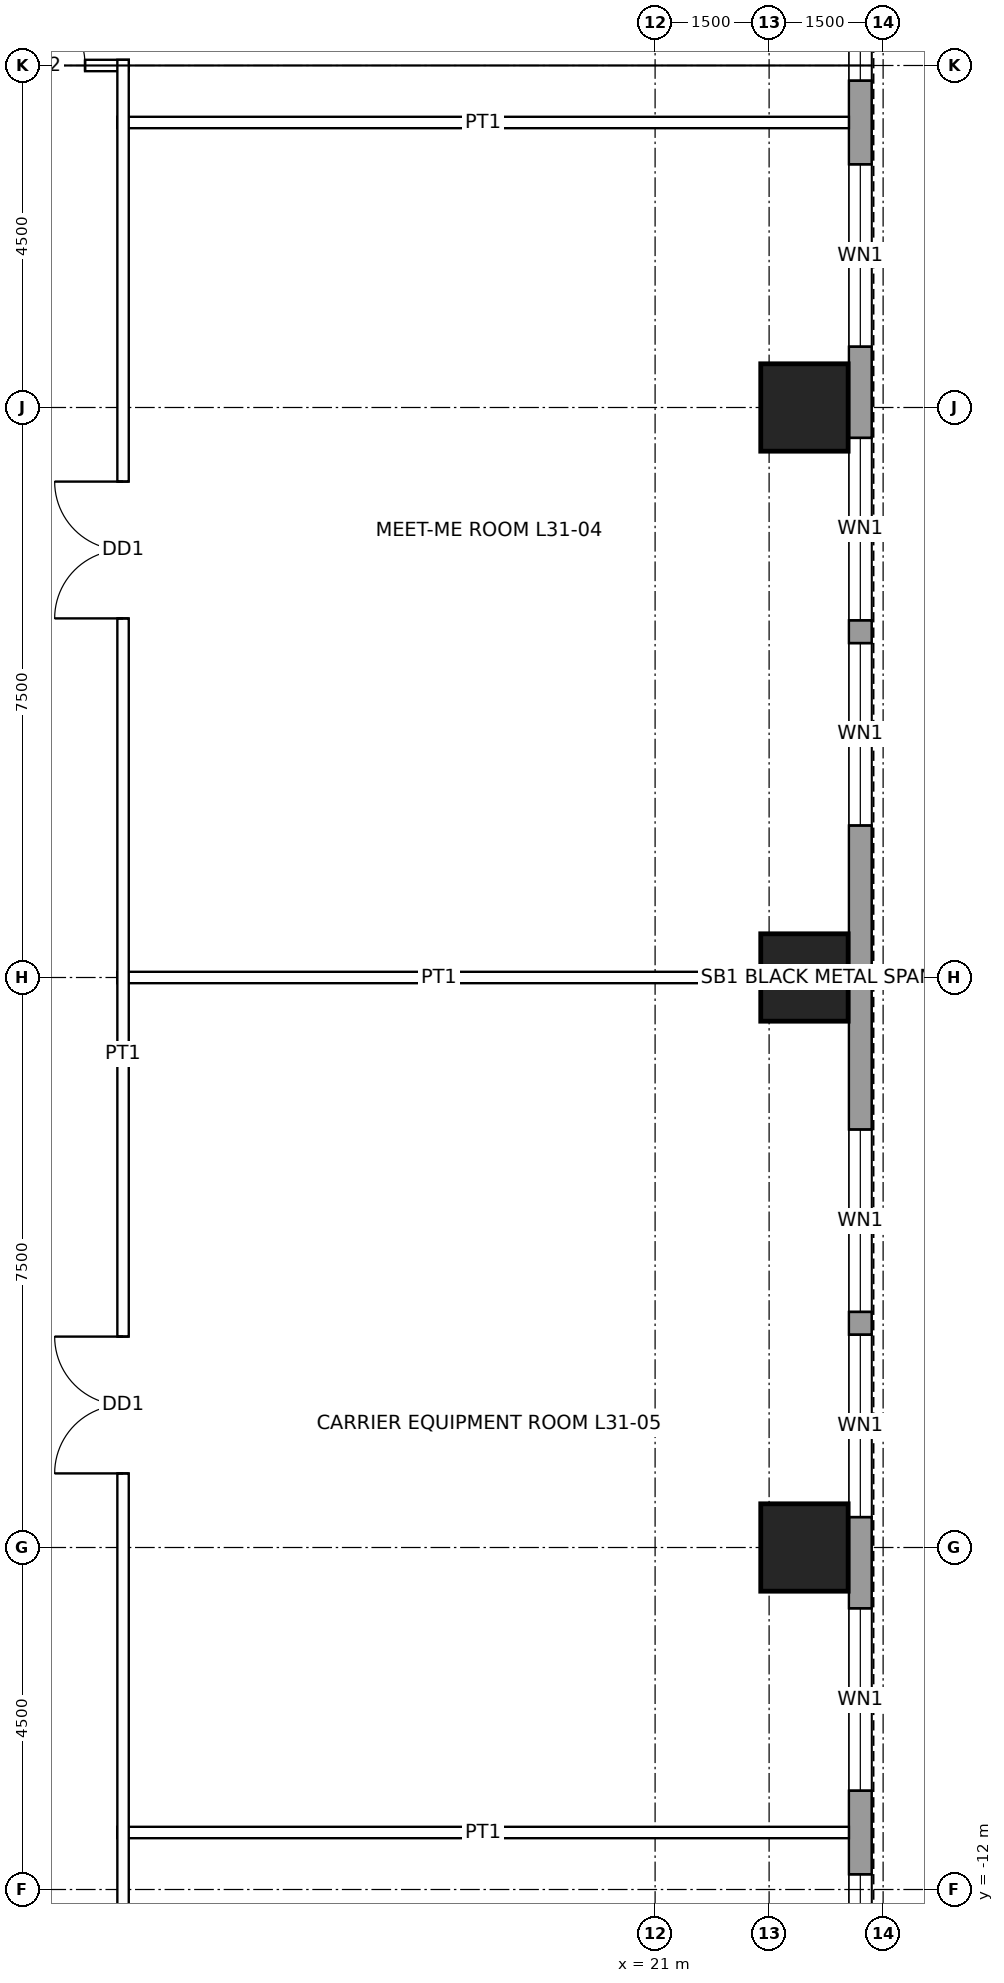
"""IFC4 building model, lengths in metres.
Left out: names, types, materials, properties, quantities, classifications, styles, units other than length and angle.
Written with IfcOpenShell. Run it as: python <this file> out.ifc"""

import sys

from ifc_helpers import new_model, si_unit, direction, frame, frame_2d, origin, origin_2d, place, context, subcontext, project, spatial, rectangle, hollow_rectangle, extrude, element, fill, save


model = new_model("IFC4")
c1 = context("Model", 3, precision=1e-05, world=origin(), true_north=direction((0.0, 1.0)))
c2 = subcontext(c1, "Body", "Model", "MODEL_VIEW")
j1 = project(units=[si_unit("LENGTHUNIT", "METRE"), si_unit("PLANEANGLEUNIT", "RADIAN")], contexts=[c1])
p1 = place(None, origin())
s1 = spatial("IfcSite", under=j1, at=p1, CompositionType="ELEMENT")
p2 = place(p1, origin())
s2 = spatial("IfcBuilding", under=s1, at=p2, CompositionType="ELEMENT")
p3 = place(p2, frame((0.0, 0.0, 153.9)))
s3 = spatial("IfcBuildingStorey", under=s2, at=p3, CompositionType="ELEMENT", Elevation=153.9)
for number, where, z_axis, x_axis in (
    (1, (22.965, 7.5, 0.0), (0.0, 0.0, 1.0), (1.0, 0.0, 0.0)),
    (2, (22.965, 0.0, 0.0), (0.0, 0.0, 1.0), (1.0, 0.0, 0.0)),
    (3, (22.965, -7.5, 0.0), (0.0, 0.0, 1.0), (1.0, 0.0, 0.0)),
):
    element("IfcColumn", number, at=place(p3, frame(where, z_axis=z_axis, x_axis=x_axis)), inside=s3, PredefinedType="COLUMN", context=c2, shape_type="SweptSolid", body=[
        extrude(hollow_rectangle(XDim=1.15, YDim=1.15, WallThickness=0.075, at=origin_2d()), origin(), (0.0, 0.0, 1.0), 4.5),
    ])
p4 = place(p3, frame((23.7, 16.2, 0.0), z_axis=(0.0, 0.0, 1.0), x_axis=(0.0, -1.0, 0.0)))
e4 = element("IfcWall", 4, at=p4, inside=s3, PredefinedType="SOLIDWALL", context=c2, shape_type="SweptSolid", body=[
    extrude(rectangle(XDim=32.4, YDim=0.3, at=frame_2d((16.2, 0.0))), origin(), (0.0, 0.0, 1.0), 4.3),
])
p5 = place(p4, frame((2.0, 0.0, 1.0)))
e5 = element("IfcOpeningElement", 5, at=p5, cuts=e4, PredefinedType="OPENING", context=c2, shape_type="SweptSolid", body=[
    extrude(rectangle(XDim=2.4, YDim=1.2, at=frame_2d((1.2, 0.6))), frame((0.0, 0.16, 0.0), z_axis=(0.0, -1.0, 0.0), x_axis=(1.0, 0.0, 0.0)), (0.0, 0.0, 1.0), 0.32),
])
p6 = place(p4, frame((5.5, 0.0, 1.0)))
e6 = element("IfcOpeningElement", 6, at=p6, cuts=e4, PredefinedType="OPENING", context=c2, shape_type="SweptSolid", body=[
    extrude(rectangle(XDim=2.4, YDim=1.2, at=frame_2d((1.2, 0.6))), frame((0.0, 0.16, 0.0), z_axis=(0.0, -1.0, 0.0), x_axis=(1.0, 0.0, 0.0)), (0.0, 0.0, 1.0), 0.32),
])
p7 = place(p4, frame((9.1, 0.0, 1.0)))
e7 = element("IfcOpeningElement", 7, at=p7, cuts=e4, PredefinedType="OPENING", context=c2, shape_type="SweptSolid", body=[
    extrude(rectangle(XDim=2.4, YDim=1.2, at=frame_2d((1.2, 0.6))), frame((0.0, 0.16, 0.0), z_axis=(0.0, -1.0, 0.0), x_axis=(1.0, 0.0, 0.0)), (0.0, 0.0, 1.0), 0.32),
])
p8 = place(p4, frame((11.8, 0.0, 1.0)))
e8 = element("IfcOpeningElement", 8, at=p8, cuts=e4, PredefinedType="OPENING", context=c2, shape_type="SweptSolid", body=[
    extrude(rectangle(XDim=2.4, YDim=1.2, at=frame_2d((1.2, 0.6))), frame((0.0, 0.16, 0.0), z_axis=(0.0, -1.0, 0.0), x_axis=(1.0, 0.0, 0.0)), (0.0, 0.0, 1.0), 0.32),
])
p9 = place(p4, frame((18.2, 0.0, 1.0)))
e9 = element("IfcOpeningElement", 9, at=p9, cuts=e4, PredefinedType="OPENING", context=c2, shape_type="SweptSolid", body=[
    extrude(rectangle(XDim=2.4, YDim=1.2, at=frame_2d((1.2, 0.6))), frame((0.0, 0.16, 0.0), z_axis=(0.0, -1.0, 0.0), x_axis=(1.0, 0.0, 0.0)), (0.0, 0.0, 1.0), 0.32),
])
p10 = place(p4, frame((20.9, 0.0, 1.0)))
e10 = element("IfcOpeningElement", 10, at=p10, cuts=e4, PredefinedType="OPENING", context=c2, shape_type="SweptSolid", body=[
    extrude(rectangle(XDim=2.4, YDim=1.2, at=frame_2d((1.2, 0.6))), frame((0.0, 0.16, 0.0), z_axis=(0.0, -1.0, 0.0), x_axis=(1.0, 0.0, 0.0)), (0.0, 0.0, 1.0), 0.32),
])
p11 = place(p4, frame((24.5, 0.0, 1.0)))
e11 = element("IfcOpeningElement", 11, at=p11, cuts=e4, PredefinedType="OPENING", context=c2, shape_type="SweptSolid", body=[
    extrude(rectangle(XDim=2.4, YDim=1.2, at=frame_2d((1.2, 0.6))), frame((0.0, 0.16, 0.0), z_axis=(0.0, -1.0, 0.0), x_axis=(1.0, 0.0, 0.0)), (0.0, 0.0, 1.0), 0.32),
])
p12 = place(p4, frame((28.0, 0.0, 1.0)))
e12 = element("IfcOpeningElement", 12, at=p12, cuts=e4, PredefinedType="OPENING", context=c2, shape_type="SweptSolid", body=[
    extrude(rectangle(XDim=2.4, YDim=1.2, at=frame_2d((1.2, 0.6))), frame((0.0, 0.16, 0.0), z_axis=(0.0, -1.0, 0.0), x_axis=(1.0, 0.0, 0.0)), (0.0, 0.0, 1.0), 0.32),
])
p13 = place(p3, frame((13.925, -11.25, 0.0), z_axis=(0.0, 0.0, 1.0), x_axis=(1.0, 0.0, 0.0)))
e13 = element("IfcWall", 13, at=p13, inside=s3, PredefinedType="PARTITIONING", context=c2, shape_type="SweptSolid", body=[
    extrude(rectangle(XDim=9.625, YDim=0.15, at=frame_2d((4.812, 0.0))), origin(), (0.0, 0.0, 1.0), 3.431),
])
p14 = place(p3, frame((13.925, 0.0, 0.0), z_axis=(0.0, 0.0, 1.0), x_axis=(1.0, 0.0, 0.0)))
e14 = element("IfcWall", 14, at=p14, inside=s3, PredefinedType="PARTITIONING", context=c2, shape_type="SweptSolid", body=[
    extrude(rectangle(XDim=8.465, YDim=0.15, at=frame_2d((4.232, 0.0))), origin(), (0.0, 0.0, 1.0), 3.431),
])
p15 = place(p3, frame((13.925, 11.25, 0.0), z_axis=(0.0, 0.0, 1.0), x_axis=(1.0, 0.0, 0.0)))
e15 = element("IfcWall", 15, at=p15, inside=s3, PredefinedType="PARTITIONING", context=c2, shape_type="SweptSolid", body=[
    extrude(rectangle(XDim=9.625, YDim=0.15, at=frame_2d((4.812, 0.0))), origin(), (0.0, 0.0, 1.0), 3.431),
])
p16 = place(p3, frame((12.0, 12.0, 0.0), z_axis=(0.0, 0.0, 1.0), x_axis=(1.0, 0.0, 0.0)))
e16 = element("IfcWall", 16, at=p16, inside=s3, PredefinedType="PARTITIONING", context=c2, shape_type="SweptSolid", body=[
    extrude(rectangle(XDim=2.075, YDim=0.15, at=frame_2d((1.038, 0.0))), origin(), (0.0, 0.0, 1.0), 3.284),
])
p17 = place(p16, frame((0.5, 0.0, 0.0)))
e17 = element("IfcOpeningElement", 17, at=p17, cuts=e16, PredefinedType="OPENING", context=c2, shape_type="SweptSolid", body=[
    extrude(rectangle(XDim=1.0, YDim=2.1, at=frame_2d((0.5, 1.05))), frame((0.0, 0.085, 0.0), z_axis=(0.0, -1.0, 0.0), x_axis=(1.0, 0.0, 0.0)), (0.0, 0.0, 1.0), 0.17),
])
p18 = place(p3, frame((14.0, -14.075, 0.0), z_axis=(0.0, 0.0, 1.0), x_axis=(0.0, 1.0, 0.0)))
e18 = element("IfcWall", 18, at=p18, inside=s3, PredefinedType="PARTITIONING", context=c2, shape_type="SweptSolid", body=[
    extrude(rectangle(XDim=26.15, YDim=0.15, at=frame_2d((13.075, 0.0))), origin(), (0.0, 0.0, 1.0), 4.3),
])
p19 = place(p18, frame((18.8, 0.0, 0.0)))
e19 = element("IfcOpeningElement", 19, at=p19, cuts=e18, PredefinedType="OPENING", context=c2, shape_type="SweptSolid", body=[
    extrude(rectangle(XDim=1.8, YDim=2.4, at=frame_2d((0.9, 1.2))), frame((0.0, 0.085, 0.0), z_axis=(0.0, -1.0, 0.0), x_axis=(1.0, 0.0, 0.0)), (0.0, 0.0, 1.0), 0.17),
])
p20 = place(p18, frame((7.55, 0.0, 0.0)))
e20 = element("IfcOpeningElement", 20, at=p20, cuts=e18, PredefinedType="OPENING", context=c2, shape_type="SweptSolid", body=[
    extrude(rectangle(XDim=1.8, YDim=2.4, at=frame_2d((0.9, 1.2))), frame((0.0, 0.085, 0.0), z_axis=(0.0, -1.0, 0.0), x_axis=(1.0, 0.0, 0.0)), (0.0, 0.0, 1.0), 0.17),
])
p21 = place(p5, origin())
e21 = element("IfcWindow", 21, at=p21, inside=s3, PartitioningType="SINGLE_PANEL", PredefinedType="WINDOW", context=c2, shape_type="SweptSolid", body=[
    extrude(rectangle(XDim=2.4, YDim=1.2, at=frame_2d((1.2, 0.6))), frame((0.0, 0.03, 0.0), z_axis=(0.0, -1.0, 0.0), x_axis=(1.0, 0.0, 0.0)), (0.0, 0.0, 1.0), 0.06),
])
fill(e5, e21)
p22 = place(p6, origin())
e22 = element("IfcWindow", 22, at=p22, inside=s3, PartitioningType="SINGLE_PANEL", PredefinedType="WINDOW", context=c2, shape_type="SweptSolid", body=[
    extrude(rectangle(XDim=2.4, YDim=1.2, at=frame_2d((1.2, 0.6))), frame((0.0, 0.03, 0.0), z_axis=(0.0, -1.0, 0.0), x_axis=(1.0, 0.0, 0.0)), (0.0, 0.0, 1.0), 0.06),
])
fill(e6, e22)
p23 = place(p7, origin())
e23 = element("IfcWindow", 23, at=p23, inside=s3, PartitioningType="SINGLE_PANEL", PredefinedType="WINDOW", context=c2, shape_type="SweptSolid", body=[
    extrude(rectangle(XDim=2.4, YDim=1.2, at=frame_2d((1.2, 0.6))), frame((0.0, 0.03, 0.0), z_axis=(0.0, -1.0, 0.0), x_axis=(1.0, 0.0, 0.0)), (0.0, 0.0, 1.0), 0.06),
])
fill(e7, e23)
p24 = place(p8, origin())
e24 = element("IfcWindow", 24, at=p24, inside=s3, PartitioningType="SINGLE_PANEL", PredefinedType="WINDOW", context=c2, shape_type="SweptSolid", body=[
    extrude(rectangle(XDim=2.4, YDim=1.2, at=frame_2d((1.2, 0.6))), frame((0.0, 0.03, 0.0), z_axis=(0.0, -1.0, 0.0), x_axis=(1.0, 0.0, 0.0)), (0.0, 0.0, 1.0), 0.06),
])
fill(e8, e24)
p25 = place(p9, origin())
e25 = element("IfcWindow", 25, at=p25, inside=s3, PartitioningType="SINGLE_PANEL", PredefinedType="WINDOW", context=c2, shape_type="SweptSolid", body=[
    extrude(rectangle(XDim=2.4, YDim=1.2, at=frame_2d((1.2, 0.6))), frame((0.0, 0.03, 0.0), z_axis=(0.0, -1.0, 0.0), x_axis=(1.0, 0.0, 0.0)), (0.0, 0.0, 1.0), 0.06),
])
fill(e9, e25)
p26 = place(p10, origin())
e26 = element("IfcWindow", 26, at=p26, inside=s3, PartitioningType="SINGLE_PANEL", PredefinedType="WINDOW", context=c2, shape_type="SweptSolid", body=[
    extrude(rectangle(XDim=2.4, YDim=1.2, at=frame_2d((1.2, 0.6))), frame((0.0, 0.03, 0.0), z_axis=(0.0, -1.0, 0.0), x_axis=(1.0, 0.0, 0.0)), (0.0, 0.0, 1.0), 0.06),
])
fill(e10, e26)
p27 = place(p11, origin())
e27 = element("IfcWindow", 27, at=p27, inside=s3, PartitioningType="SINGLE_PANEL", PredefinedType="WINDOW", context=c2, shape_type="SweptSolid", body=[
    extrude(rectangle(XDim=2.4, YDim=1.2, at=frame_2d((1.2, 0.6))), frame((0.0, 0.03, 0.0), z_axis=(0.0, -1.0, 0.0), x_axis=(1.0, 0.0, 0.0)), (0.0, 0.0, 1.0), 0.06),
])
fill(e11, e27)
p28 = place(p12, origin())
e28 = element("IfcWindow", 28, at=p28, inside=s3, PartitioningType="SINGLE_PANEL", PredefinedType="WINDOW", context=c2, shape_type="SweptSolid", body=[
    extrude(rectangle(XDim=2.4, YDim=1.2, at=frame_2d((1.2, 0.6))), frame((0.0, 0.03, 0.0), z_axis=(0.0, -1.0, 0.0), x_axis=(1.0, 0.0, 0.0)), (0.0, 0.0, 1.0), 0.06),
])
fill(e12, e28)
p29 = place(p19, origin())
e29 = element("IfcDoor", 29, at=p29, inside=s3, OperationType="DOUBLE_DOOR_SINGLE_SWING", PredefinedType="DOOR", context=c2, shape_type="SweptSolid", body=[
    extrude(rectangle(XDim=1.8, YDim=2.4, at=frame_2d((0.9, 1.2))), frame((0.0, 0.025, 0.0), z_axis=(0.0, -1.0, 0.0), x_axis=(1.0, 0.0, 0.0)), (0.0, 0.0, 1.0), 0.05),
])
fill(e19, e29)
p30 = place(p20, origin())
e30 = element("IfcDoor", 30, at=p30, inside=s3, OperationType="DOUBLE_DOOR_SINGLE_SWING", PredefinedType="DOOR", context=c2, shape_type="SweptSolid", body=[
    extrude(rectangle(XDim=1.8, YDim=2.4, at=frame_2d((0.9, 1.2))), frame((0.0, 0.025, 0.0), z_axis=(0.0, -1.0, 0.0), x_axis=(1.0, 0.0, 0.0)), (0.0, 0.0, 1.0), 0.05),
])
fill(e20, e30)
p31 = place(p17, origin())
e31 = element("IfcDoor", 31, at=p31, inside=s3, OperationType="SINGLE_SWING_LEFT", PredefinedType="DOOR", context=c2, shape_type="SweptSolid", body=[
    extrude(rectangle(XDim=1.0, YDim=2.1, at=frame_2d((0.5, 1.05))), frame((0.0, 0.025, 0.0), z_axis=(0.0, -1.0, 0.0), x_axis=(1.0, 0.0, 0.0)), (0.0, 0.0, 1.0), 0.05),
])
fill(e17, e31)
save(model, sys.argv[1])
